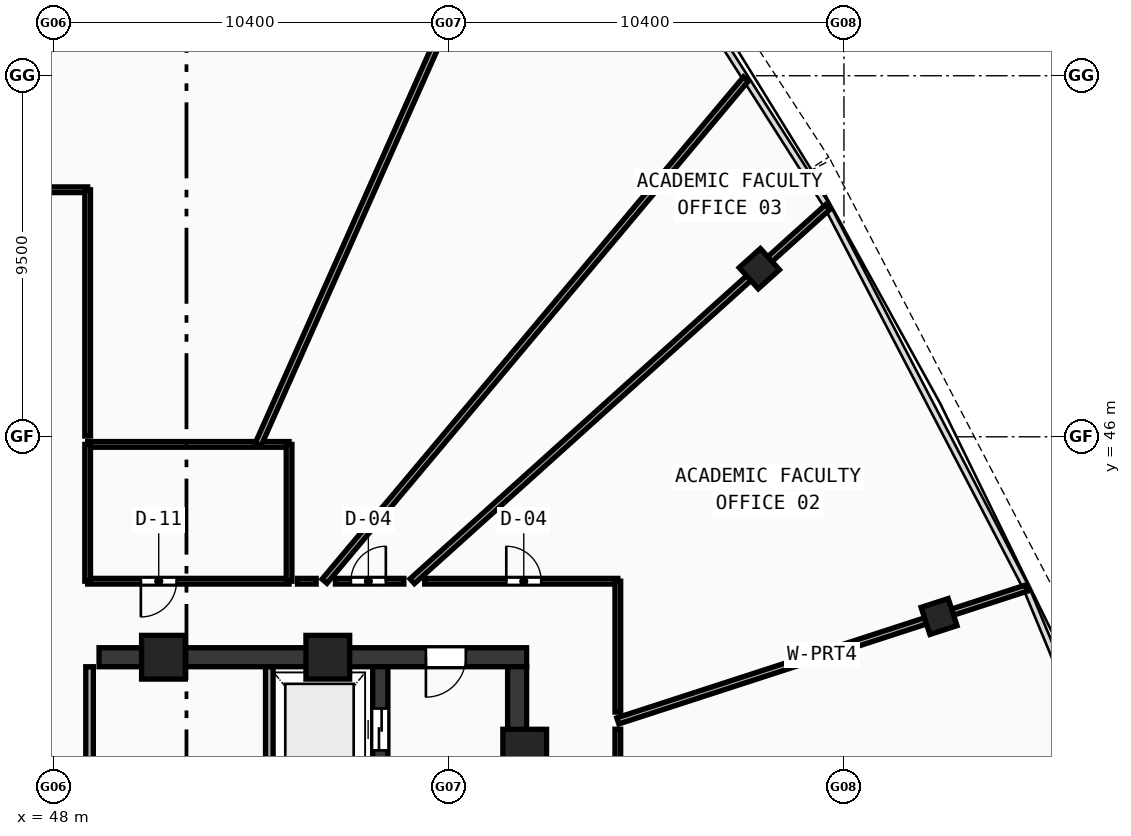
"""IFC4 building model, lengths in metres.
Left out: names, types, materials, properties, quantities, classifications, styles, units other than length and angle.
Written with IfcOpenShell. Run it as: python <this file> out.ifc"""

import sys

from ifc_helpers import new_model, si_unit, direction, frame, frame_2d, origin, origin_with_axes, origin_2d, place, context, subcontext, project, spatial, rectangle, hollow_rectangle, extrude, source, transform, mapped, element, fill, save


model = new_model("IFC4")
c1 = context("Model", 3, precision=1e-05, world=origin(), true_north=direction((0.0, 1.0)))
c2 = subcontext(c1, "Body", "Model", "MODEL_VIEW")
j1 = project(units=[si_unit("LENGTHUNIT", "METRE"), si_unit("PLANEANGLEUNIT", "RADIAN")], contexts=[c1])
p1 = place(None, origin())
s1 = spatial("IfcSite", under=j1, at=p1, CompositionType="ELEMENT")
p2 = place(p1, origin())
s2 = spatial("IfcBuilding", under=s1, at=p2, CompositionType="ELEMENT")
p3 = place(p2, frame((0.0, 0.0, 288.75)))
s3 = spatial("IfcBuildingStorey", under=s2, at=p3, CompositionType="ELEMENT", Elevation=288.75)
p4 = place(p3, frame((49.2, 40.2, 0.0), z_axis=(0.0, 0.0, 1.0), x_axis=(1.0, 0.0, 0.0)))
e1 = element("IfcWall", 1, at=p4, inside=s3, PredefinedType="SHEAR", context=c2, shape_type="SweptSolid", body=[
    extrude(rectangle(XDim=11.25, YDim=0.5, at=frame_2d((5.625, 0.0))), origin(), (0.0, 0.0, 1.0), 3.47),
])
p5 = place(p4, frame((8.6, 0.0, 0.0)))
e2 = element("IfcOpeningElement", 2, at=p5, cuts=e1, PredefinedType="OPENING", context=c2, shape_type="SweptSolid", body=[
    extrude(rectangle(XDim=1.05, YDim=2.1, at=frame_2d((0.525, 1.05))), frame((0.0, 0.26, 0.0), z_axis=(0.0, -1.0, 0.0), x_axis=(1.0, 0.0, 0.0)), (0.0, 0.0, 1.0), 0.52),
])
p6 = place(p3, frame((60.2, 27.75, 0.0), z_axis=(0.0, 0.0, 1.0), x_axis=(0.0, 1.0, 0.0)))
e3 = element("IfcWall", 3, at=p6, inside=s3, PredefinedType="SHEAR", context=c2, shape_type="SweptSolid", body=[
    extrude(rectangle(XDim=12.2, YDim=0.5, at=frame_2d((6.1, 0.0))), origin(), (0.0, 0.0, 1.0), 3.47),
])
p7 = place(p3, frame((56.6, 27.75, 0.0), z_axis=(0.0, 0.0, 1.0), x_axis=(0.0, 1.0, 0.0)))
e4 = element("IfcWall", 4, at=p7, inside=s3, PredefinedType="SHEAR", context=c2, shape_type="SweptSolid", body=[
    extrude(rectangle(XDim=12.2, YDim=0.4, at=frame_2d((6.1, 0.0))), origin(), (0.0, 0.0, 1.0), 3.47),
])
p8 = place(p7, frame((10.0, 0.0, 0.0)))
e5 = element("IfcOpeningElement", 5, at=p8, cuts=e4, PredefinedType="OPENING", context=c2, shape_type="SweptSolid", body=[
    extrude(rectangle(XDim=1.1, YDim=2.1, at=frame_2d((0.55, 1.05))), frame((0.0, 0.21, 0.0), z_axis=(0.0, -1.0, 0.0), x_axis=(1.0, 0.0, 0.0)), (0.0, 0.0, 1.0), 0.42),
])
m1 = source(origin(), c2, "Body", "SweptSolid", [
    extrude(hollow_rectangle(XDim=1.15, YDim=1.15, WallThickness=0.048, at=origin_2d()), origin(), (0.0, 0.0, 1.0), 3.73),
])
for number, where, z_axis, x_axis in (
    (6, (60.4, 37.729, -0.26), (0.0, 0.0, 1.0), (1.0, 0.0, 0.0)),
    (7, (55.219, 40.2, -0.26), (0.0, 0.0, 1.0), (1.0, 0.0, 0.0)),
    (8, (50.894, 40.2, -0.26), (0.0, 0.0, 1.0), (1.0, 0.0, 0.0)),
):
    element("IfcColumn", number, at=place(p3, frame(where, z_axis=z_axis, x_axis=x_axis)), inside=s3, PredefinedType="COLUMN", context=c2, shape_type="MappedRepresentation", body=[
        mapped(m1, transform((0.0, 0.0, 0.0), scale=1.0)),
    ])
m2 = source(origin(), c2, "Body", "SweptSolid", [
    extrude(hollow_rectangle(XDim=0.75, YDim=0.75, WallThickness=0.028, at=origin_2d()), origin(), (0.0, 0.0, 1.0), 3.73),
])
for number, where, z_axis, x_axis in (
    (9, (71.302, 41.271, -0.26), (0.0, 0.0, 1.0), (-0.309, 0.951, 0.0)),
    (10, (66.573, 50.424, -0.26), (0.0, 0.0, 1.0), (-0.669, 0.743, 0.0)),
):
    element("IfcColumn", number, at=place(p3, frame(where, z_axis=z_axis, x_axis=x_axis)), inside=s3, PredefinedType="COLUMN", context=c2, shape_type="MappedRepresentation", body=[
        mapped(m2, transform((0.0, 0.0, 0.0), scale=1.0)),
    ])
p9 = place(p3, frame((53.68, 36.65, 0.0), z_axis=(0.0, 0.0, 1.0), x_axis=(0.0, 1.0, 0.0)))
e11 = element("IfcWall", 11, at=p9, inside=s3, PredefinedType="SOLIDWALL", context=c2, shape_type="SweptSolid", body=[
    extrude(rectangle(XDim=3.3, YDim=0.2, at=frame_2d((1.65, 0.0))), origin(), (0.0, 0.0, 1.0), 3.47),
])
p10 = place(p3, frame((48.95, 35.85, 0.0), z_axis=(0.0, 0.0, 1.0), x_axis=(0.0, 1.0, 0.0)))
e12 = element("IfcWall", 12, at=p10, inside=s3, PredefinedType="SOLIDWALL", context=c2, shape_type="SweptSolid", body=[
    extrude(rectangle(XDim=4.1, YDim=0.2, at=frame_2d((2.05, 0.0))), origin(), (0.0, 0.0, 1.0), 3.47),
])
p11 = place(p3, frame((48.9, 42.2, 0.0), z_axis=(0.0, 0.0, 1.0), x_axis=(1.0, 0.0, 0.0)))
e13 = element("IfcWall", 13, at=p11, inside=s3, PredefinedType="PARTITIONING", context=c2, shape_type="SweptSolid", body=[
    extrude(rectangle(XDim=5.3, YDim=0.15, at=frame_2d((2.65, 0.0))), origin(), (0.0, 0.0, 1.0), 2.87),
])
p12 = place(p11, frame((1.4, 0.0, 0.0)))
e14 = element("IfcOpeningElement", 14, at=p12, cuts=e13, PredefinedType="OPENING", context=c2, shape_type="SweptSolid", body=[
    extrude(rectangle(XDim=0.94, YDim=2.1, at=frame_2d((0.47, 1.05))), frame((0.0, 0.085, 0.0), z_axis=(0.0, -1.0, 0.0), x_axis=(1.0, 0.0, 0.0)), (0.0, 0.0, 1.0), 0.17),
])
p13 = place(p3, frame((48.9, 45.8, 0.0), z_axis=(0.0, 0.0, 1.0), x_axis=(1.0, 0.0, 0.0)))
e15 = element("IfcWall", 15, at=p13, inside=s3, PredefinedType="PARTITIONING", context=c2, shape_type="SweptSolid", body=[
    extrude(rectangle(XDim=5.3, YDim=0.15, at=frame_2d((2.65, 0.0))), origin(), (0.0, 0.0, 1.0), 2.87),
])
for number, where, z_axis, x_axis in (
    (16, (48.9, 42.2, 0.0), (0.0, 0.0, 1.0), (0.0, 1.0, 0.0)),
    (17, (54.2, 42.2, 0.0), (0.0, 0.0, 1.0), (0.0, 1.0, 0.0)),
):
    element("IfcWall", number, at=place(p3, frame(where, z_axis=z_axis, x_axis=x_axis)), inside=s3, PredefinedType="PARTITIONING", context=c2, shape_type="SweptSolid", body=[
        extrude(rectangle(XDim=3.6, YDim=0.15, at=frame_2d((1.8, 0.0))), origin(), (0.0, 0.0, 1.0), 3.47),
    ])
p14 = place(p3, frame((62.85, 38.525, 0.0), z_axis=(0.0, 0.0, 1.0), x_axis=(0.951060099206, 0.309005967092, 0.0)))
e18 = element("IfcWall", 18, at=p14, inside=s3, PredefinedType="PARTITIONING", context=c2, shape_type="SweptSolid", body=[
    extrude(rectangle(XDim=11.302, YDim=0.17, at=frame_2d((5.651, 0.0))), origin(), (0.0, 0.0, 1.0), 2.87),
])
p15 = place(p3, frame((57.44, 42.2, 0.0), z_axis=(0.0, 0.0, 1.0), x_axis=(0.743145593795, 0.669129753055, 0.0)))
e19 = element("IfcWall", 19, at=p15, inside=s3, PredefinedType="PARTITIONING", context=c2, shape_type="SweptSolid", body=[
    extrude(rectangle(XDim=14.711, YDim=0.17, at=frame_2d((7.355, 0.0))), origin(), (0.0, 0.0, 1.0), 2.87),
])
p16 = place(p3, frame((55.132, 42.2, 0.0), z_axis=(0.0, 0.0, 1.0), x_axis=(0.642779182264, 0.766051514487, 0.0)))
e20 = element("IfcWall", 20, at=p16, inside=s3, PredefinedType="PARTITIONING", context=c2, shape_type="SweptSolid", body=[
    extrude(rectangle(XDim=17.254, YDim=0.17, at=frame_2d((8.627, 0.0))), origin(), (0.0, 0.0, 1.0), 2.87),
])
p17 = place(p3, frame((53.387, 45.8, 0.0), z_axis=(0.0, 0.0, 1.0), x_axis=(0.406740781751, 0.913543614975, 0.0)))
e21 = element("IfcWall", 21, at=p17, inside=s3, PredefinedType="PARTITIONING", context=c2, shape_type="SweptSolid", body=[
    extrude(rectangle(XDim=19.177, YDim=0.17, at=frame_2d((9.589, 0.0))), origin(), (0.0, 0.0, 1.0), 2.87),
])
p18 = place(p3, frame((47.1, 52.5, 0.0), z_axis=(0.0, 0.0, 1.0), x_axis=(1.0, 0.0, 0.0)))
e22 = element("IfcWall", 22, at=p18, inside=s3, PredefinedType="PARTITIONING", context=c2, shape_type="SweptSolid", body=[
    extrude(rectangle(XDim=1.8, YDim=0.15, at=frame_2d((0.9, 0.0))), origin(), (0.0, 0.0, 1.0), 3.47),
])
p19 = place(p3, frame((48.9, 52.5, 0.0), z_axis=(0.0, 0.0, 1.0), x_axis=(0.0, -1.0, 0.0)))
e23 = element("IfcWall", 23, at=p19, inside=s3, PredefinedType="PARTITIONING", context=c2, shape_type="SweptSolid", body=[
    extrude(rectangle(XDim=6.48, YDim=0.15, at=frame_2d((3.24, 0.0))), origin(), (0.0, 0.0, 1.0), 3.12),
])
p20 = place(p3, frame((54.42, 42.2, 0.0), z_axis=(0.0, 0.0, 1.0), x_axis=(1.0, 0.0, 0.0)))
e24 = element("IfcWall", 24, at=p20, inside=s3, PredefinedType="PARTITIONING", context=c2, shape_type="SweptSolid", body=[
    extrude(rectangle(XDim=0.492, YDim=0.15, at=frame_2d((0.246, 0.0))), origin(), (0.0, 0.0, 1.0), 3.47),
])
p21 = place(p3, frame((55.419, 42.2, 0.0), z_axis=(0.0, 0.0, 1.0), x_axis=(1.0, 0.0, 0.0)))
e25 = element("IfcWall", 25, at=p21, inside=s3, PredefinedType="PARTITIONING", context=c2, shape_type="SweptSolid", body=[
    extrude(rectangle(XDim=1.801, YDim=0.15, at=frame_2d((0.9, 0.0))), origin(), (0.0, 0.0, 1.0), 2.87),
])
p22 = place(p21, frame((0.407, 0.0, 0.0)))
e26 = element("IfcOpeningElement", 26, at=p22, cuts=e25, PredefinedType="OPENING", context=c2, shape_type="SweptSolid", body=[
    extrude(rectangle(XDim=0.92, YDim=2.1, at=frame_2d((0.46, 1.05))), frame((0.0, 0.085, 0.0), z_axis=(0.0, -1.0, 0.0), x_axis=(1.0, 0.0, 0.0)), (0.0, 0.0, 1.0), 0.17),
])
p23 = place(p3, frame((57.769, 42.2, 0.0), z_axis=(0.0, 0.0, 1.0), x_axis=(1.0, 0.0, 0.0)))
e27 = element("IfcWall", 27, at=p23, inside=s3, PredefinedType="PARTITIONING", context=c2, shape_type="SweptSolid", body=[
    extrude(rectangle(XDim=5.081, YDim=0.15, at=frame_2d((2.541, 0.0))), origin(), (0.0, 0.0, 1.0), 3.12),
])
p24 = place(p23, frame((2.146, 0.0, 0.0)))
e28 = element("IfcOpeningElement", 28, at=p24, cuts=e27, PredefinedType="OPENING", context=c2, shape_type="SweptSolid", body=[
    extrude(rectangle(XDim=0.92, YDim=2.1, at=frame_2d((0.46, 1.05))), frame((0.0, 0.085, 0.0), z_axis=(0.0, -1.0, 0.0), x_axis=(1.0, 0.0, 0.0)), (0.0, 0.0, 1.0), 0.17),
])
p25 = place(p3, frame((62.85, 42.2, 0.0), z_axis=(0.0, 0.0, 1.0), x_axis=(0.0, -1.0, 0.0)))
e29 = element("IfcWall", 29, at=p25, inside=s3, PredefinedType="PARTITIONING", context=c2, shape_type="SweptSolid", body=[
    extrude(rectangle(XDim=3.444, YDim=0.15, at=frame_2d((1.722, 0.0))), origin(), (0.0, 0.0, 1.0), 3.12),
])
p26 = place(p3, frame((62.85, 38.305, 0.0), z_axis=(0.0, 0.0, 1.0), x_axis=(0.0, -1.0, 0.0)))
e30 = element("IfcWall", 30, at=p26, inside=s3, PredefinedType="PARTITIONING", context=c2, shape_type="SweptSolid", body=[
    extrude(rectangle(XDim=7.004, YDim=0.15, at=frame_2d((3.502, 0.0))), origin(), (0.0, 0.0, 1.0), 3.47),
])
p27 = place(p26, frame((3.042, 0.0, 0.0)))
e31 = element("IfcOpeningElement", 31, at=p27, cuts=e30, PredefinedType="OPENING", context=c2, shape_type="SweptSolid", body=[
    extrude(rectangle(XDim=0.92, YDim=2.1, at=frame_2d((0.46, 1.05))), frame((0.0, 0.085, 0.0), z_axis=(0.0, -1.0, 0.0), x_axis=(1.0, 0.0, 0.0)), (0.0, 0.0, 1.0), 0.17),
])
m3 = source(origin(), c2, "Body", "SweptSolid", [
    extrude(rectangle(XDim=1.05, YDim=2.1, at=frame_2d((0.525, 1.05))), frame((0.0, 0.025, 0.0), z_axis=(0.0, -1.0, 0.0), x_axis=(1.0, 0.0, 0.0)), (0.0, 0.0, 1.0), 0.05),
])
p28 = place(p5, frame((1.05, 0.0, 0.0), z_axis=(0.0, 0.0, 1.0), x_axis=(-1.0, 0.0, 0.0)))
e32 = element("IfcDoor", 32, at=p28, inside=s3, OperationType="SINGLE_SWING_RIGHT", PredefinedType="DOOR", context=c2, shape_type="MappedRepresentation", body=[
    mapped(m3, transform((0.0, 0.0, 0.0), scale=1.0)),
])
fill(e2, e32)
m4 = source(origin(), c2, "Body", "SweptSolid", [
    extrude(rectangle(XDim=1.1, YDim=2.1, at=frame_2d((0.55, 1.05))), frame((0.0, 0.025, 0.0), z_axis=(0.0, -1.0, 0.0), x_axis=(1.0, 0.0, 0.0)), (0.0, 0.0, 1.0), 0.05),
])
p29 = place(p8, origin_with_axes())
e33 = element("IfcDoor", 33, at=p29, inside=s3, OperationType="DOUBLE_DOOR_SLIDING", PredefinedType="DOOR", context=c2, shape_type="MappedRepresentation", body=[
    mapped(m4, transform((0.0, 0.0, 0.0), scale=1.0)),
])
fill(e5, e33)
m5 = source(origin(), c2, "Body", "SweptSolid", [
    extrude(rectangle(XDim=0.94, YDim=2.1, at=frame_2d((0.47, 1.05))), frame((0.0, 0.025, 0.0), z_axis=(0.0, -1.0, 0.0), x_axis=(1.0, 0.0, 0.0)), (0.0, 0.0, 1.0), 0.05),
])
p30 = place(p12, frame((0.94, 0.0, 0.0), z_axis=(0.0, 0.0, 1.0), x_axis=(-1.0, 0.0, 0.0)))
e34 = element("IfcDoor", 34, at=p30, inside=s3, OperationType="SINGLE_SWING_RIGHT", PredefinedType="DOOR", context=c2, shape_type="MappedRepresentation", body=[
    mapped(m5, transform((0.0, 0.0, 0.0), scale=1.0)),
])
fill(e14, e34)
m6 = source(origin(), c2, "Body", "SweptSolid", [
    extrude(rectangle(XDim=0.92, YDim=2.1, at=frame_2d((0.46, 1.05))), frame((0.0, 0.025, 0.0), z_axis=(0.0, -1.0, 0.0), x_axis=(1.0, 0.0, 0.0)), (0.0, 0.0, 1.0), 0.05),
])
p31 = place(p24, origin_with_axes())
e35 = element("IfcDoor", 35, at=p31, inside=s3, OperationType="SINGLE_SWING_LEFT", PredefinedType="DOOR", context=c2, shape_type="MappedRepresentation", body=[
    mapped(m6, transform((0.0, 0.0, 0.0), scale=1.0)),
])
fill(e28, e35)
p32 = place(p22, origin_with_axes())
e36 = element("IfcDoor", 36, at=p32, inside=s3, OperationType="SINGLE_SWING_RIGHT", PredefinedType="DOOR", context=c2, shape_type="MappedRepresentation", body=[
    mapped(m6, transform((0.0, 0.0, 0.0), scale=1.0)),
])
fill(e26, e36)
save(model, sys.argv[1])
